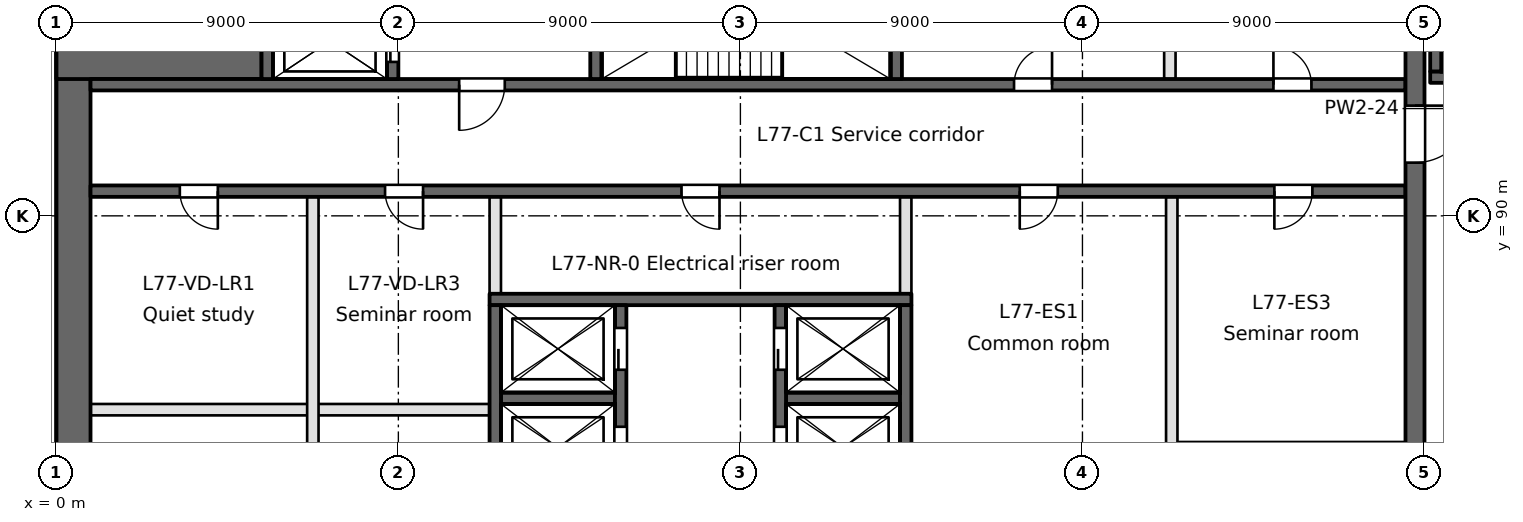
"""IFC4 building model, lengths in metres.
Left out: names, types, materials, properties, quantities, classifications, styles, units other than length and angle.
Written with IfcOpenShell. Run it as: python <this file> out.ifc"""

import sys

from ifc_helpers import new_model, si_unit, direction, frame, frame_2d, origin, place, context, subcontext, project, spatial, rectangle, extrude, element, fill, save


model = new_model("IFC4")
c1 = context("Model", 3, precision=1e-05, world=origin(), true_north=direction((0.0, 1.0)))
c2 = subcontext(c1, "Body", "Model", "MODEL_VIEW")
j1 = project(units=[si_unit("LENGTHUNIT", "METRE"), si_unit("PLANEANGLEUNIT", "RADIAN")], contexts=[c1])
p1 = place(None, origin())
s1 = spatial("IfcSite", under=j1, at=p1, CompositionType="ELEMENT")
p2 = place(p1, origin())
s2 = spatial("IfcBuilding", under=s1, at=p2, CompositionType="ELEMENT")
p3 = place(p2, frame((0.0, 0.0, 299.3)))
s3 = spatial("IfcBuildingStorey", under=s2, at=p3, CompositionType="ELEMENT", Elevation=299.3)
p4 = place(p3, frame((0.45, 94.5, 0.0), z_axis=(0.0, 0.0, 1.0), x_axis=(0.0, -1.0, 0.0)))
e1 = element("IfcWall", 1, at=p4, inside=s3, PredefinedType="SHEAR", context=c2, shape_type="SweptSolid", body=[
    extrude(rectangle(XDim=40.456, YDim=0.9, at=frame_2d((20.228, 0.0))), origin(), (0.0, 0.0, 1.0), 3.7),
])
for number, where, z_axis, x_axis in (
    (2, (4.95, 99.0, 0.0), (0.0, 0.0, 1.0), (0.0, -1.0, 0.0)),
    (3, (5.4, 94.05, 0.0), (0.0, 0.0, 1.0), (-1.0, 0.0, 0.0)),
):
    element("IfcWall", number, at=place(p3, frame(where, z_axis=z_axis, x_axis=x_axis)), inside=s3, PredefinedType="SHEAR", context=c2, shape_type="SweptSolid", body=[
        extrude(rectangle(XDim=5.4, YDim=0.9, at=frame_2d((2.7, 0.0))), origin(), (0.0, 0.0, 1.0), 3.7),
    ])
p5 = place(p3, frame((0.9, 84.9, 0.0), z_axis=(0.0, 0.0, 1.0), x_axis=(1.0, 0.0, 0.0)))
e4 = element("IfcWall", 4, at=p5, inside=s3, PredefinedType="PARTITIONING", context=c2, shape_type="SweptSolid", body=[
    extrude(rectangle(XDim=10.5, YDim=0.3, at=frame_2d((5.25, 0.0))), origin(), (0.0, 0.0, 1.0), 3.25),
])
for number, where, z_axis, x_axis in (
    (5, (11.7, 85.2, -0.4), (0.0, 0.0, 1.0), (1.0, 0.0, 0.0)),
    (6, (19.2, 85.2, -0.4), (0.0, 0.0, 1.0), (1.0, 0.0, 0.0)),
):
    element("IfcWall", number, at=place(p3, frame(where, z_axis=z_axis, x_axis=x_axis)), inside=s3, PredefinedType="SOLIDWALL", context=c2, shape_type="SweptSolid", body=[
        extrude(rectangle(XDim=3.0, YDim=0.3, at=frame_2d((1.5, 0.0))), origin(), (0.0, 0.0, 1.0), 3.65),
    ])
p6 = place(p3, frame((11.4, 87.8, -0.4), z_axis=(0.0, 0.0, 1.0), x_axis=(1.0, 0.0, 0.0)))
e7 = element("IfcWall", 7, at=p6, inside=s3, PredefinedType="SOLIDWALL", context=c2, shape_type="SweptSolid", body=[
    extrude(rectangle(XDim=11.1, YDim=0.3, at=frame_2d((5.55, 0.0))), origin(), (0.0, 0.0, 1.0), 3.65),
])
p7 = place(p3, frame((0.9, 90.65, -0.4), z_axis=(0.0, 0.0, 1.0), x_axis=(1.0, 0.0, 0.0)))
e8 = element("IfcWall", 8, at=p7, inside=s3, PredefinedType="SOLIDWALL", context=c2, shape_type="SweptSolid", body=[
    extrude(rectangle(XDim=34.6, YDim=0.3, at=frame_2d((17.3, 0.0))), origin(), (0.0, 0.0, 1.0), 3.65),
])
p8 = place(p7, frame((15.55, 0.0, 0.4)))
e9 = element("IfcOpeningElement", 9, at=p8, cuts=e8, PredefinedType="OPENING", context=c2, shape_type="SweptSolid", body=[
    extrude(rectangle(XDim=1.0, YDim=2.1, at=frame_2d((0.5, 1.05))), frame((0.0, 0.15, 0.0), z_axis=(0.0, -1.0, 0.0), x_axis=(1.0, 0.0, 0.0)), (0.0, 0.0, 1.0), 0.3),
])
p9 = place(p7, frame((2.35, 0.0, 0.4)))
e10 = element("IfcOpeningElement", 10, at=p9, cuts=e8, PredefinedType="OPENING", context=c2, shape_type="SweptSolid", body=[
    extrude(rectangle(XDim=1.0, YDim=2.1, at=frame_2d((0.5, 1.05))), frame((0.0, 0.15, 0.0), z_axis=(0.0, -1.0, 0.0), x_axis=(1.0, 0.0, 0.0)), (0.0, 0.0, 1.0), 0.3),
])
p10 = place(p7, frame((7.75, 0.0, 0.4)))
e11 = element("IfcOpeningElement", 11, at=p10, cuts=e8, PredefinedType="OPENING", context=c2, shape_type="SweptSolid", body=[
    extrude(rectangle(XDim=1.0, YDim=2.1, at=frame_2d((0.5, 1.05))), frame((0.0, 0.15, 0.0), z_axis=(0.0, -1.0, 0.0), x_axis=(1.0, 0.0, 0.0)), (0.0, 0.0, 1.0), 0.3),
])
p11 = place(p7, frame((24.45, 0.0, 0.4)))
e12 = element("IfcOpeningElement", 12, at=p11, cuts=e8, PredefinedType="OPENING", context=c2, shape_type="SweptSolid", body=[
    extrude(rectangle(XDim=1.0, YDim=2.1, at=frame_2d((0.5, 1.05))), frame((0.0, 0.15, 0.0), z_axis=(0.0, -1.0, 0.0), x_axis=(1.0, 0.0, 0.0)), (0.0, 0.0, 1.0), 0.3),
])
p12 = place(p7, frame((31.15, 0.0, 0.4)))
e13 = element("IfcOpeningElement", 13, at=p12, cuts=e8, PredefinedType="OPENING", context=c2, shape_type="SweptSolid", body=[
    extrude(rectangle(XDim=1.0, YDim=2.1, at=frame_2d((0.5, 1.05))), frame((0.0, 0.15, 0.0), z_axis=(0.0, -1.0, 0.0), x_axis=(1.0, 0.0, 0.0)), (0.0, 0.0, 1.0), 0.3),
])
p13 = place(p3, frame((0.9, 93.45, -0.4), z_axis=(0.0, 0.0, 1.0), x_axis=(1.0, 0.0, 0.0)))
e14 = element("IfcWall", 14, at=p13, inside=s3, PredefinedType="SOLIDWALL", context=c2, shape_type="SweptSolid", body=[
    extrude(rectangle(XDim=34.6, YDim=0.3, at=frame_2d((17.3, 0.0))), origin(), (0.0, 0.0, 1.0), 3.65),
])
p14 = place(p13, frame((9.7, 0.0, 0.4)))
e15 = element("IfcOpeningElement", 15, at=p14, cuts=e14, PredefinedType="OPENING", context=c2, shape_type="SweptSolid", body=[
    extrude(rectangle(XDim=1.2, YDim=2.1, at=frame_2d((0.6, 1.05))), frame((0.0, 0.15, 0.0), z_axis=(0.0, -1.0, 0.0), x_axis=(1.0, 0.0, 0.0)), (0.0, 0.0, 1.0), 0.3),
])
p15 = place(p13, frame((24.3, 0.0, 0.4)))
e16 = element("IfcOpeningElement", 16, at=p15, cuts=e14, PredefinedType="OPENING", context=c2, shape_type="SweptSolid", body=[
    extrude(rectangle(XDim=1.0, YDim=2.1, at=frame_2d((0.5, 1.05))), frame((0.0, 0.15, 0.0), z_axis=(0.0, -1.0, 0.0), x_axis=(1.0, 0.0, 0.0)), (0.0, 0.0, 1.0), 0.3),
])
p16 = place(p13, frame((31.125, 0.0, 0.4)))
e17 = element("IfcOpeningElement", 17, at=p16, cuts=e14, PredefinedType="OPENING", context=c2, shape_type="SweptSolid", body=[
    extrude(rectangle(XDim=1.0, YDim=2.1, at=frame_2d((0.5, 1.05))), frame((0.0, 0.15, 0.0), z_axis=(0.0, -1.0, 0.0), x_axis=(1.0, 0.0, 0.0)), (0.0, 0.0, 1.0), 0.3),
])
p17 = place(p3, frame((36.15, 93.65, -0.4), z_axis=(0.0, 0.0, 1.0), x_axis=(1.0, 0.0, 0.0)))
e18 = element("IfcWall", 18, at=p17, inside=s3, PredefinedType="SOLIDWALL", context=c2, shape_type="SweptSolid", body=[
    extrude(rectangle(XDim=8.2, YDim=0.3, at=frame_2d((4.1, 0.0))), origin(), (0.0, 0.0, 1.0), 3.65),
])
p18 = place(p17, frame((0.7, 0.0, 0.4)))
e19 = element("IfcOpeningElement", 19, at=p18, cuts=e18, PredefinedType="OPENING", context=c2, shape_type="SweptSolid", body=[
    extrude(rectangle(XDim=1.2, YDim=2.1, at=frame_2d((0.6, 1.05))), frame((0.0, 0.15, 0.0), z_axis=(0.0, -1.0, 0.0), x_axis=(1.0, 0.0, 0.0)), (0.0, 0.0, 1.0), 0.3),
])
p19 = place(p3, frame((5.55, 93.6, -0.4), z_axis=(0.0, 0.0, 1.0), x_axis=(0.0, 1.0, 0.0)))
e20 = element("IfcWall", 20, at=p19, inside=s3, PredefinedType="SOLIDWALL", context=c2, shape_type="SweptSolid", body=[
    extrude(rectangle(XDim=4.5, YDim=0.3, at=frame_2d((2.25, 0.0))), origin(), (0.0, 0.0, 1.0), 3.65),
])
p20 = place(p3, frame((6.75, 77.55, 0.0), z_axis=(0.0, 0.0, 1.0), x_axis=(0.0, 1.0, 0.0)))
e21 = element("IfcWall", 21, at=p20, inside=s3, PredefinedType="PARTITIONING", context=c2, shape_type="SweptSolid", body=[
    extrude(rectangle(XDim=12.95, YDim=0.3, at=frame_2d((6.475, 0.0))), origin(), (0.0, 0.0, 1.0), 3.25),
])
p21 = place(p3, frame((8.85, 93.6, -0.4), z_axis=(0.0, 0.0, 1.0), x_axis=(0.0, 1.0, 0.0)))
e22 = element("IfcWall", 22, at=p21, inside=s3, PredefinedType="SOLIDWALL", context=c2, shape_type="SweptSolid", body=[
    extrude(rectangle(XDim=4.5, YDim=0.3, at=frame_2d((2.25, 0.0))), origin(), (0.0, 0.0, 1.0), 3.65),
])
p22 = place(p21, frame((0.45, 0.0, 0.4)))
e23 = element("IfcOpeningElement", 23, at=p22, cuts=e22, PredefinedType="OPENING", context=c2, shape_type="SweptSolid", body=[
    extrude(rectangle(XDim=1.1, YDim=2.1, at=frame_2d((0.55, 1.05))), frame((0.0, 0.15, 0.0), z_axis=(0.0, -1.0, 0.0), x_axis=(1.0, 0.0, 0.0)), (0.0, 0.0, 1.0), 0.3),
])
p23 = place(p21, frame((2.85, 0.0, 0.4)))
e24 = element("IfcOpeningElement", 24, at=p23, cuts=e22, PredefinedType="OPENING", context=c2, shape_type="SweptSolid", body=[
    extrude(rectangle(XDim=1.1, YDim=2.1, at=frame_2d((0.55, 1.05))), frame((0.0, 0.15, 0.0), z_axis=(0.0, -1.0, 0.0), x_axis=(1.0, 0.0, 0.0)), (0.0, 0.0, 1.0), 0.3),
])
p24 = place(p3, frame((11.55, 77.55, -0.4), z_axis=(0.0, 0.0, 1.0), x_axis=(0.0, 1.0, 0.0)))
e25 = element("IfcWall", 25, at=p24, inside=s3, PredefinedType="SOLIDWALL", context=c2, shape_type="SweptSolid", body=[
    extrude(rectangle(XDim=10.1, YDim=0.3, at=frame_2d((5.05, 0.0))), origin(), (0.0, 0.0, 1.0), 3.65),
])
p25 = place(p3, frame((11.55, 87.95, 0.0), z_axis=(0.0, 0.0, 1.0), x_axis=(0.0, 1.0, 0.0)))
e26 = element("IfcWall", 26, at=p25, inside=s3, PredefinedType="PARTITIONING", context=c2, shape_type="SweptSolid", body=[
    extrude(rectangle(XDim=2.55, YDim=0.3, at=frame_2d((1.275, 0.0))), origin(), (0.0, 0.0, 1.0), 3.25),
])
p26 = place(p3, frame((14.2, 93.6, -0.4), z_axis=(0.0, 0.0, 1.0), x_axis=(0.0, 1.0, 0.0)))
e27 = element("IfcWall", 27, at=p26, inside=s3, PredefinedType="SOLIDWALL", context=c2, shape_type="SweptSolid", body=[
    extrude(rectangle(XDim=4.5, YDim=0.3, at=frame_2d((2.25, 0.0))), origin(), (0.0, 0.0, 1.0), 3.65),
])
p27 = place(p26, frame((1.8, 0.0, 0.4)))
e28 = element("IfcOpeningElement", 28, at=p27, cuts=e27, PredefinedType="OPENING", context=c2, shape_type="SweptSolid", body=[
    extrude(rectangle(XDim=1.2, YDim=2.1, at=frame_2d((0.6, 1.05))), frame((0.0, 0.15, 0.0), z_axis=(0.0, -1.0, 0.0), x_axis=(1.0, 0.0, 0.0)), (0.0, 0.0, 1.0), 0.3),
])
p28 = place(p3, frame((14.85, 77.55, -0.4), z_axis=(0.0, 0.0, 1.0), x_axis=(0.0, 1.0, 0.0)))
e29 = element("IfcWall", 29, at=p28, inside=s3, PredefinedType="SOLIDWALL", context=c2, shape_type="SweptSolid", body=[
    extrude(rectangle(XDim=10.1, YDim=0.3, at=frame_2d((5.05, 0.0))), origin(), (0.0, 0.0, 1.0), 3.65),
])
p29 = place(p28, frame((0.6, 0.0, 0.4)))
e30 = element("IfcOpeningElement", 30, at=p29, cuts=e29, PredefinedType="OPENING", context=c2, shape_type="SweptSolid", body=[
    extrude(rectangle(XDim=1.1, YDim=2.1, at=frame_2d((0.55, 1.05))), frame((0.0, 0.15, 0.0), z_axis=(0.0, -1.0, 0.0), x_axis=(1.0, 0.0, 0.0)), (0.0, 0.0, 1.0), 0.3),
])
p30 = place(p28, frame((3.2, 0.0, 0.4)))
e31 = element("IfcOpeningElement", 31, at=p30, cuts=e29, PredefinedType="OPENING", context=c2, shape_type="SweptSolid", body=[
    extrude(rectangle(XDim=1.1, YDim=2.1, at=frame_2d((0.55, 1.05))), frame((0.0, 0.15, 0.0), z_axis=(0.0, -1.0, 0.0), x_axis=(1.0, 0.0, 0.0)), (0.0, 0.0, 1.0), 0.3),
])
p31 = place(p28, frame((5.8, 0.0, 0.4)))
e32 = element("IfcOpeningElement", 32, at=p31, cuts=e29, PredefinedType="OPENING", context=c2, shape_type="SweptSolid", body=[
    extrude(rectangle(XDim=1.1, YDim=2.1, at=frame_2d((0.55, 1.05))), frame((0.0, 0.15, 0.0), z_axis=(0.0, -1.0, 0.0), x_axis=(1.0, 0.0, 0.0)), (0.0, 0.0, 1.0), 0.3),
])
p32 = place(p28, frame((8.4, 0.0, 0.4)))
e33 = element("IfcOpeningElement", 33, at=p32, cuts=e29, PredefinedType="OPENING", context=c2, shape_type="SweptSolid", body=[
    extrude(rectangle(XDim=1.1, YDim=2.1, at=frame_2d((0.55, 1.05))), frame((0.0, 0.15, 0.0), z_axis=(0.0, -1.0, 0.0), x_axis=(1.0, 0.0, 0.0)), (0.0, 0.0, 1.0), 0.3),
])
p33 = place(p3, frame((19.05, 77.55, -0.4), z_axis=(0.0, 0.0, 1.0), x_axis=(0.0, 1.0, 0.0)))
e34 = element("IfcWall", 34, at=p33, inside=s3, PredefinedType="SOLIDWALL", context=c2, shape_type="SweptSolid", body=[
    extrude(rectangle(XDim=10.1, YDim=0.3, at=frame_2d((5.05, 0.0))), origin(), (0.0, 0.0, 1.0), 3.65),
])
p34 = place(p33, frame((0.6, 0.0, 0.4)))
e35 = element("IfcOpeningElement", 35, at=p34, cuts=e34, PredefinedType="OPENING", context=c2, shape_type="SweptSolid", body=[
    extrude(rectangle(XDim=1.1, YDim=2.1, at=frame_2d((0.55, 1.05))), frame((0.0, 0.15, 0.0), z_axis=(0.0, -1.0, 0.0), x_axis=(1.0, 0.0, 0.0)), (0.0, 0.0, 1.0), 0.3),
])
p35 = place(p33, frame((3.2, 0.0, 0.4)))
e36 = element("IfcOpeningElement", 36, at=p35, cuts=e34, PredefinedType="OPENING", context=c2, shape_type="SweptSolid", body=[
    extrude(rectangle(XDim=1.1, YDim=2.1, at=frame_2d((0.55, 1.05))), frame((0.0, 0.15, 0.0), z_axis=(0.0, -1.0, 0.0), x_axis=(1.0, 0.0, 0.0)), (0.0, 0.0, 1.0), 0.3),
])
p36 = place(p33, frame((5.8, 0.0, 0.4)))
e37 = element("IfcOpeningElement", 37, at=p36, cuts=e34, PredefinedType="OPENING", context=c2, shape_type="SweptSolid", body=[
    extrude(rectangle(XDim=1.1, YDim=2.1, at=frame_2d((0.55, 1.05))), frame((0.0, 0.15, 0.0), z_axis=(0.0, -1.0, 0.0), x_axis=(1.0, 0.0, 0.0)), (0.0, 0.0, 1.0), 0.3),
])
p37 = place(p33, frame((8.4, 0.0, 0.4)))
e38 = element("IfcOpeningElement", 38, at=p37, cuts=e34, PredefinedType="OPENING", context=c2, shape_type="SweptSolid", body=[
    extrude(rectangle(XDim=1.1, YDim=2.1, at=frame_2d((0.55, 1.05))), frame((0.0, 0.15, 0.0), z_axis=(0.0, -1.0, 0.0), x_axis=(1.0, 0.0, 0.0)), (0.0, 0.0, 1.0), 0.3),
])
p38 = place(p3, frame((22.1, 93.6, -0.4), z_axis=(0.0, 0.0, 1.0), x_axis=(0.0, 1.0, 0.0)))
e39 = element("IfcWall", 39, at=p38, inside=s3, PredefinedType="SOLIDWALL", context=c2, shape_type="SweptSolid", body=[
    extrude(rectangle(XDim=4.5, YDim=0.3, at=frame_2d((2.25, 0.0))), origin(), (0.0, 0.0, 1.0), 3.65),
])
p39 = place(p3, frame((22.35, 77.55, -0.4), z_axis=(0.0, 0.0, 1.0), x_axis=(0.0, 1.0, 0.0)))
e40 = element("IfcWall", 40, at=p39, inside=s3, PredefinedType="SOLIDWALL", context=c2, shape_type="SweptSolid", body=[
    extrude(rectangle(XDim=10.1, YDim=0.3, at=frame_2d((5.05, 0.0))), origin(), (0.0, 0.0, 1.0), 3.65),
])
p40 = place(p3, frame((22.35, 87.95, 0.0), z_axis=(0.0, 0.0, 1.0), x_axis=(0.0, 1.0, 0.0)))
e41 = element("IfcWall", 41, at=p40, inside=s3, PredefinedType="PARTITIONING", context=c2, shape_type="SweptSolid", body=[
    extrude(rectangle(XDim=2.55, YDim=0.3, at=frame_2d((1.275, 0.0))), origin(), (0.0, 0.0, 1.0), 3.25),
])
p41 = place(p3, frame((29.3, 93.6, 0.0), z_axis=(0.0, 0.0, 1.0), x_axis=(0.0, 1.0, 0.0)))
e42 = element("IfcWall", 42, at=p41, inside=s3, PredefinedType="PARTITIONING", context=c2, shape_type="SweptSolid", body=[
    extrude(rectangle(XDim=4.5, YDim=0.3, at=frame_2d((2.25, 0.0))), origin(), (0.0, 0.0, 1.0), 3.25),
])
p42 = place(p3, frame((29.35, 77.55, 0.0), z_axis=(0.0, 0.0, 1.0), x_axis=(0.0, 1.0, 0.0)))
e43 = element("IfcWall", 43, at=p42, inside=s3, PredefinedType="PARTITIONING", context=c2, shape_type="SweptSolid", body=[
    extrude(rectangle(XDim=12.95, YDim=0.3, at=frame_2d((6.475, 0.0))), origin(), (0.0, 0.0, 1.0), 3.25),
])
p43 = place(p3, frame((35.75, 63.5, -0.4), z_axis=(0.0, 0.0, 1.0), x_axis=(0.0, 1.0, 0.0)))
e44 = element("IfcWall", 44, at=p43, inside=s3, PredefinedType="SOLIDWALL", context=c2, shape_type="SweptSolid", body=[
    extrude(rectangle(XDim=34.6, YDim=0.5, at=frame_2d((17.3, 0.0))), origin(), (0.0, 0.0, 1.0), 3.65),
])
p44 = place(p43, frame((9.7, 0.0, 0.4)))
e45 = element("IfcOpeningElement", 45, at=p44, cuts=e44, PredefinedType="OPENING", context=c2, shape_type="SweptSolid", body=[
    extrude(rectangle(XDim=2.4, YDim=2.1, at=frame_2d((1.2, 1.05))), frame((0.0, 0.25, 0.0), z_axis=(0.0, -1.0, 0.0), x_axis=(1.0, 0.0, 0.0)), (0.0, 0.0, 1.0), 0.5),
])
p45 = place(p43, frame((27.9, 0.0, 0.4)))
e46 = element("IfcOpeningElement", 46, at=p45, cuts=e44, PredefinedType="OPENING", context=c2, shape_type="SweptSolid", body=[
    extrude(rectangle(XDim=1.5, YDim=2.1, at=frame_2d((0.75, 1.05))), frame((0.0, 0.25, 0.0), z_axis=(0.0, -1.0, 0.0), x_axis=(1.0, 0.0, 0.0)), (0.0, 0.0, 1.0), 0.5),
])
p46 = place(p43, frame((1.5, 0.0, 0.4)))
e47 = element("IfcOpeningElement", 47, at=p46, cuts=e44, PredefinedType="OPENING", context=c2, shape_type="SweptSolid", body=[
    extrude(rectangle(XDim=1.2, YDim=2.1, at=frame_2d((0.6, 1.05))), frame((0.0, 0.25, 0.0), z_axis=(0.0, -1.0, 0.0), x_axis=(1.0, 0.0, 0.0)), (0.0, 0.0, 1.0), 0.5),
])
p47 = place(p3, frame((36.3, 93.8, -0.4), z_axis=(0.0, 0.0, 1.0), x_axis=(0.0, 1.0, 0.0)))
e48 = element("IfcWall", 48, at=p47, inside=s3, PredefinedType="SOLIDWALL", context=c2, shape_type="SweptSolid", body=[
    extrude(rectangle(XDim=4.3, YDim=0.3, at=frame_2d((2.15, 0.0))), origin(), (0.0, 0.0, 1.0), 3.65),
])
p48 = place(p31, origin())
e49 = element("IfcDoor", 49, at=p48, inside=s3, OperationType="SLIDING_TO_RIGHT", PredefinedType="DOOR", context=c2, shape_type="SweptSolid", body=[
    extrude(rectangle(XDim=1.1, YDim=2.1, at=frame_2d((0.55, 1.05))), frame((0.0, 0.025, 0.0), z_axis=(0.0, -1.0, 0.0), x_axis=(1.0, 0.0, 0.0)), (0.0, 0.0, 1.0), 0.05),
])
fill(e32, e49)
p49 = place(p32, origin())
e50 = element("IfcDoor", 50, at=p49, inside=s3, OperationType="SLIDING_TO_LEFT", PredefinedType="DOOR", context=c2, shape_type="SweptSolid", body=[
    extrude(rectangle(XDim=1.1, YDim=2.1, at=frame_2d((0.55, 1.05))), frame((0.0, 0.025, 0.0), z_axis=(0.0, -1.0, 0.0), x_axis=(1.0, 0.0, 0.0)), (0.0, 0.0, 1.0), 0.05),
])
fill(e33, e50)
p50 = place(p36, origin())
e51 = element("IfcDoor", 51, at=p50, inside=s3, OperationType="SLIDING_TO_RIGHT", PredefinedType="DOOR", context=c2, shape_type="SweptSolid", body=[
    extrude(rectangle(XDim=1.1, YDim=2.1, at=frame_2d((0.55, 1.05))), frame((0.0, 0.025, 0.0), z_axis=(0.0, -1.0, 0.0), x_axis=(1.0, 0.0, 0.0)), (0.0, 0.0, 1.0), 0.05),
])
fill(e37, e51)
p51 = place(p37, origin())
e52 = element("IfcDoor", 52, at=p51, inside=s3, OperationType="SLIDING_TO_LEFT", PredefinedType="DOOR", context=c2, shape_type="SweptSolid", body=[
    extrude(rectangle(XDim=1.1, YDim=2.1, at=frame_2d((0.55, 1.05))), frame((0.0, 0.025, 0.0), z_axis=(0.0, -1.0, 0.0), x_axis=(1.0, 0.0, 0.0)), (0.0, 0.0, 1.0), 0.05),
])
fill(e38, e52)
p52 = place(p22, origin())
e53 = element("IfcDoor", 53, at=p52, inside=s3, OperationType="SLIDING_TO_RIGHT", PredefinedType="DOOR", context=c2, shape_type="SweptSolid", body=[
    extrude(rectangle(XDim=1.1, YDim=2.1, at=frame_2d((0.55, 1.05))), frame((0.0, 0.025, 0.0), z_axis=(0.0, -1.0, 0.0), x_axis=(1.0, 0.0, 0.0)), (0.0, 0.0, 1.0), 0.05),
])
fill(e23, e53)
p53 = place(p14, frame((1.2, 0.0, 0.0), z_axis=(0.0, 0.0, 1.0), x_axis=(-1.0, 0.0, 0.0)))
e54 = element("IfcDoor", 54, at=p53, inside=s3, OperationType="SINGLE_SWING_RIGHT", PredefinedType="DOOR", context=c2, shape_type="SweptSolid", body=[
    extrude(rectangle(XDim=1.2, YDim=2.1, at=frame_2d((0.6, 1.05))), frame((0.0, 0.025, 0.0), z_axis=(0.0, -1.0, 0.0), x_axis=(1.0, 0.0, 0.0)), (0.0, 0.0, 1.0), 0.05),
])
fill(e15, e54)
p54 = place(p45, frame((1.5, 0.0, 0.0), z_axis=(0.0, 0.0, 1.0), x_axis=(-1.0, 0.0, 0.0)))
e55 = element("IfcDoor", 55, at=p54, inside=s3, OperationType="SINGLE_SWING_LEFT", PredefinedType="DOOR", context=c2, shape_type="SweptSolid", body=[
    extrude(rectangle(XDim=1.5, YDim=2.1, at=frame_2d((0.75, 1.05))), frame((0.0, 0.025, 0.0), z_axis=(0.0, -1.0, 0.0), x_axis=(1.0, 0.0, 0.0)), (0.0, 0.0, 1.0), 0.05),
])
fill(e46, e55)
p55 = place(p8, frame((1.0, 0.0, 0.0), z_axis=(0.0, 0.0, 1.0), x_axis=(-1.0, 0.0, 0.0)))
e56 = element("IfcDoor", 56, at=p55, inside=s3, OperationType="SINGLE_SWING_LEFT", PredefinedType="DOOR", context=c2, shape_type="SweptSolid", body=[
    extrude(rectangle(XDim=1.0, YDim=2.1, at=frame_2d((0.5, 1.05))), frame((0.0, 0.025, 0.0), z_axis=(0.0, -1.0, 0.0), x_axis=(1.0, 0.0, 0.0)), (0.0, 0.0, 1.0), 0.05),
])
fill(e9, e56)
p56 = place(p9, frame((1.0, 0.0, 0.0), z_axis=(0.0, 0.0, 1.0), x_axis=(-1.0, 0.0, 0.0)))
e57 = element("IfcDoor", 57, at=p56, inside=s3, OperationType="SINGLE_SWING_LEFT", PredefinedType="DOOR", context=c2, shape_type="SweptSolid", body=[
    extrude(rectangle(XDim=1.0, YDim=2.1, at=frame_2d((0.5, 1.05))), frame((0.0, 0.025, 0.0), z_axis=(0.0, -1.0, 0.0), x_axis=(1.0, 0.0, 0.0)), (0.0, 0.0, 1.0), 0.05),
])
fill(e10, e57)
p57 = place(p10, frame((1.0, 0.0, 0.0), z_axis=(0.0, 0.0, 1.0), x_axis=(-1.0, 0.0, 0.0)))
e58 = element("IfcDoor", 58, at=p57, inside=s3, OperationType="SINGLE_SWING_LEFT", PredefinedType="DOOR", context=c2, shape_type="SweptSolid", body=[
    extrude(rectangle(XDim=1.0, YDim=2.1, at=frame_2d((0.5, 1.05))), frame((0.0, 0.025, 0.0), z_axis=(0.0, -1.0, 0.0), x_axis=(1.0, 0.0, 0.0)), (0.0, 0.0, 1.0), 0.05),
])
fill(e11, e58)
p58 = place(p11, frame((1.0, 0.0, 0.0), z_axis=(0.0, 0.0, 1.0), x_axis=(-1.0, 0.0, 0.0)))
e59 = element("IfcDoor", 59, at=p58, inside=s3, OperationType="SINGLE_SWING_RIGHT", PredefinedType="DOOR", context=c2, shape_type="SweptSolid", body=[
    extrude(rectangle(XDim=1.0, YDim=2.1, at=frame_2d((0.5, 1.05))), frame((0.0, 0.025, 0.0), z_axis=(0.0, -1.0, 0.0), x_axis=(1.0, 0.0, 0.0)), (0.0, 0.0, 1.0), 0.05),
])
fill(e12, e59)
p59 = place(p12, frame((1.0, 0.0, 0.0), z_axis=(0.0, 0.0, 1.0), x_axis=(-1.0, 0.0, 0.0)))
e60 = element("IfcDoor", 60, at=p59, inside=s3, OperationType="SINGLE_SWING_RIGHT", PredefinedType="DOOR", context=c2, shape_type="SweptSolid", body=[
    extrude(rectangle(XDim=1.0, YDim=2.1, at=frame_2d((0.5, 1.05))), frame((0.0, 0.025, 0.0), z_axis=(0.0, -1.0, 0.0), x_axis=(1.0, 0.0, 0.0)), (0.0, 0.0, 1.0), 0.05),
])
fill(e13, e60)
p60 = place(p15, origin())
e61 = element("IfcDoor", 61, at=p60, inside=s3, OperationType="SINGLE_SWING_RIGHT", PredefinedType="DOOR", context=c2, shape_type="SweptSolid", body=[
    extrude(rectangle(XDim=1.0, YDim=2.1, at=frame_2d((0.5, 1.05))), frame((0.0, 0.025, 0.0), z_axis=(0.0, -1.0, 0.0), x_axis=(1.0, 0.0, 0.0)), (0.0, 0.0, 1.0), 0.05),
])
fill(e16, e61)
p61 = place(p16, origin())
e62 = element("IfcDoor", 62, at=p61, inside=s3, OperationType="SINGLE_SWING_LEFT", PredefinedType="DOOR", context=c2, shape_type="SweptSolid", body=[
    extrude(rectangle(XDim=1.0, YDim=2.1, at=frame_2d((0.5, 1.05))), frame((0.0, 0.025, 0.0), z_axis=(0.0, -1.0, 0.0), x_axis=(1.0, 0.0, 0.0)), (0.0, 0.0, 1.0), 0.05),
])
fill(e17, e62)
save(model, sys.argv[1])
